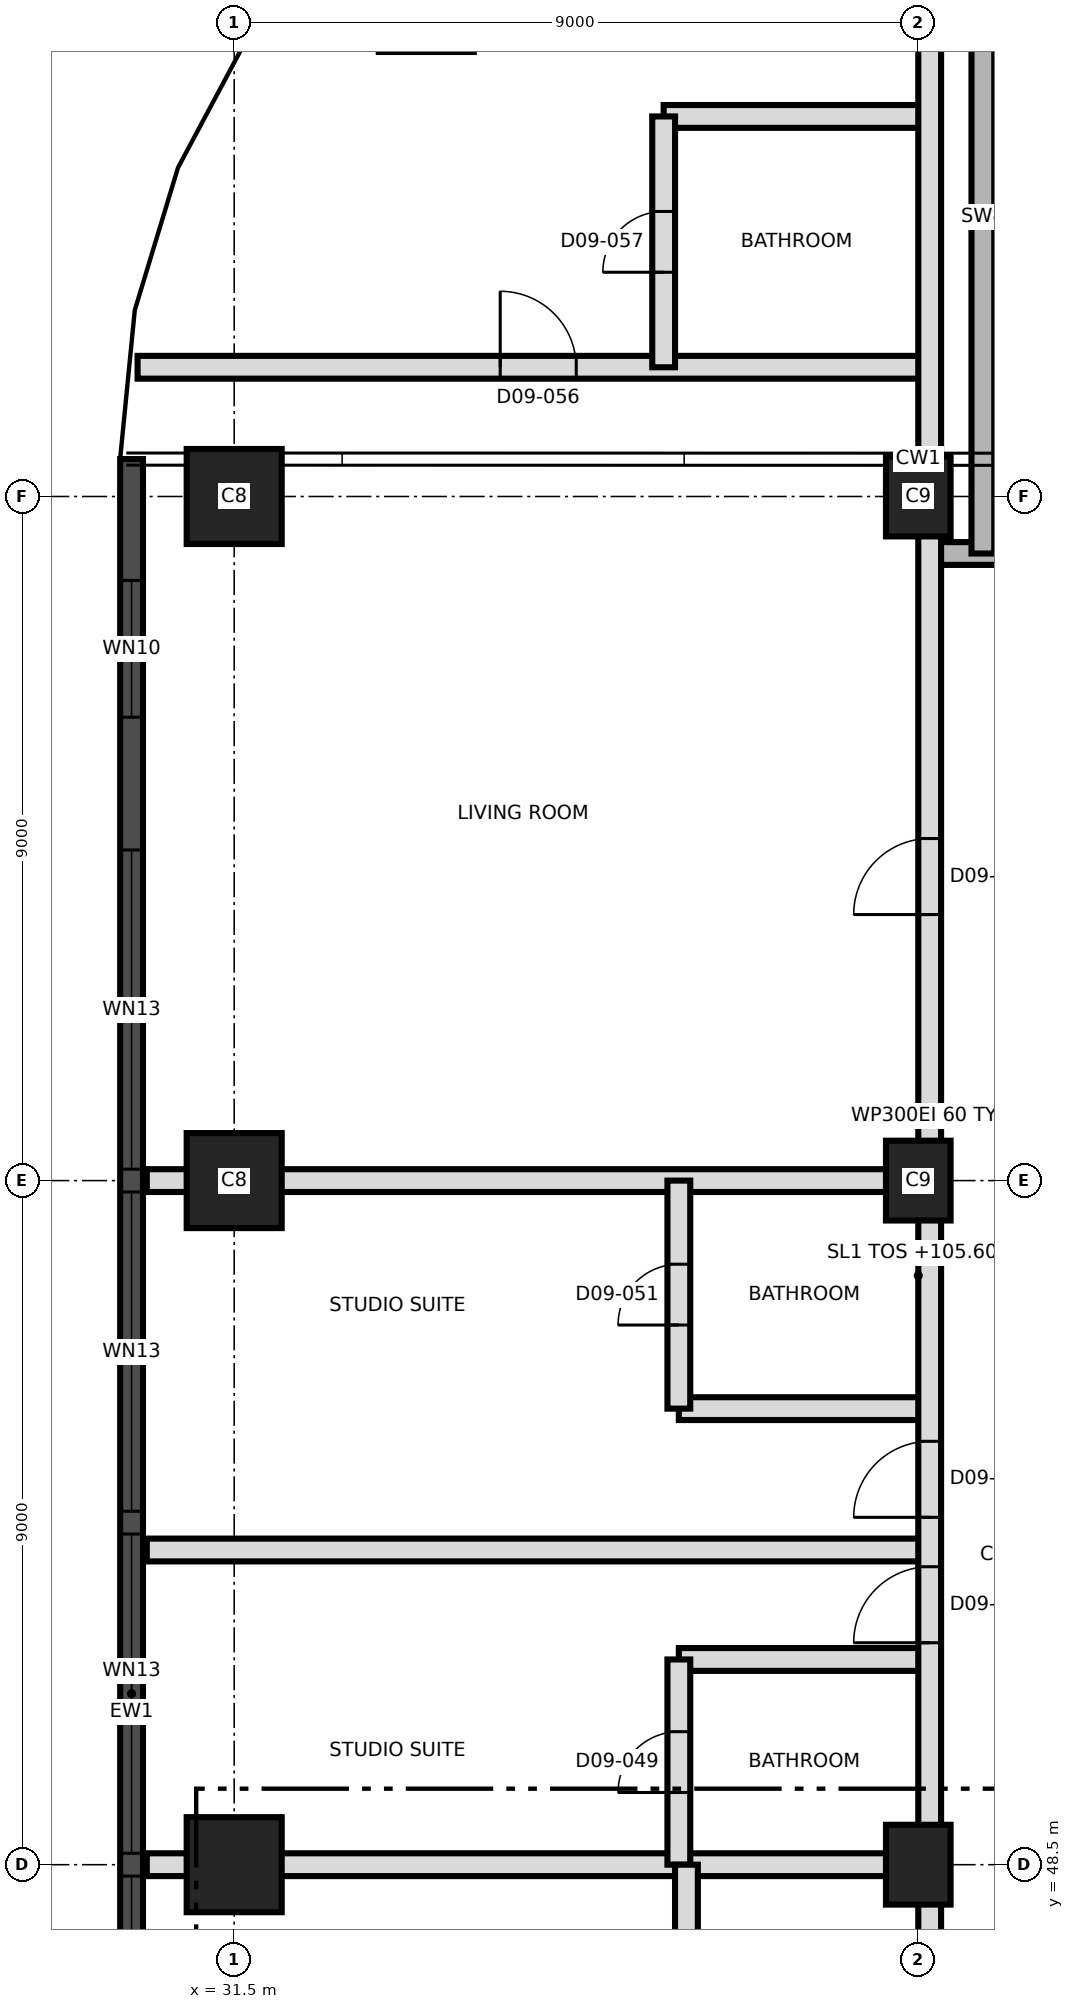
"""IFC4 building model, lengths in metres.
Left out: names, types, materials, properties, quantities, classifications, styles, units other than length and angle.
Written with IfcOpenShell. Run it as: python <this file> out.ifc"""

import sys

from ifc_helpers import new_model, si_unit, direction, frame, frame_2d, origin, origin_2d, place, context, subcontext, project, spatial, rectangle, extrude, element, fill, save


model = new_model("IFC4")
c1 = context("Model", 3, precision=1e-05, world=origin(), true_north=direction((0.0, 1.0)))
c2 = subcontext(c1, "Body", "Model", "MODEL_VIEW")
j1 = project(units=[si_unit("LENGTHUNIT", "METRE"), si_unit("PLANEANGLEUNIT", "RADIAN")], contexts=[c1])
p1 = place(None, origin())
s1 = spatial("IfcSite", under=j1, at=p1, CompositionType="ELEMENT")
p2 = place(p1, origin())
s2 = spatial("IfcBuilding", under=s1, at=p2, CompositionType="ELEMENT")
p3 = place(p2, frame((0.0, 0.0, 105.6)))
s3 = spatial("IfcBuildingStorey", under=s2, at=p3, CompositionType="ELEMENT", Elevation=105.6)
p4 = place(p3, frame((31.5, 48.5, 0.0), z_axis=(0.0, 0.0, 1.0), x_axis=(1.0, 0.0, 0.0)))
e1 = element("IfcColumn", 1, at=p4, inside=s3, PredefinedType="COLUMN", context=c2, shape_type="SweptSolid", body=[
    extrude(rectangle(XDim=1.25, YDim=1.25, at=origin_2d()), origin(), (0.0, 0.0, 1.0), 3.7),
])
p5 = place(p3, frame((40.5, 48.5, 0.0), z_axis=(0.0, 0.0, 1.0), x_axis=(0.0, 1.0, 0.0)))
e2 = element("IfcColumn", 2, at=p5, inside=s3, PredefinedType="COLUMN", context=c2, shape_type="SweptSolid", body=[
    extrude(rectangle(XDim=1.05, YDim=0.85, at=origin_2d()), origin(), (0.0, 0.0, 1.0), 3.7),
])
p6 = place(p3, frame((31.5, 57.5, 0.0), z_axis=(0.0, 0.0, 1.0), x_axis=(1.0, 0.0, 0.0)))
e3 = element("IfcColumn", 3, at=p6, inside=s3, PredefinedType="COLUMN", context=c2, shape_type="SweptSolid", body=[
    extrude(rectangle(XDim=1.25, YDim=1.25, at=origin_2d()), origin(), (0.0, 0.0, 1.0), 3.7),
])
p7 = place(p3, frame((40.5, 57.5, 0.0), z_axis=(0.0, 0.0, 1.0), x_axis=(0.0, 1.0, 0.0)))
e4 = element("IfcColumn", 4, at=p7, inside=s3, PredefinedType="COLUMN", context=c2, shape_type="SweptSolid", body=[
    extrude(rectangle(XDim=1.05, YDim=0.85, at=origin_2d()), origin(), (0.0, 0.0, 1.0), 3.7),
])
p8 = place(p3, frame((31.5, 66.5, 0.0), z_axis=(0.0, 0.0, 1.0), x_axis=(1.0, 0.0, 0.0)))
e5 = element("IfcColumn", 5, at=p8, inside=s3, PredefinedType="COLUMN", context=c2, shape_type="SweptSolid", body=[
    extrude(rectangle(XDim=1.25, YDim=1.25, at=origin_2d()), origin(), (0.0, 0.0, 1.0), 3.7),
])
p9 = place(p3, frame((40.5, 66.5, 0.0), z_axis=(0.0, 0.0, 1.0), x_axis=(0.0, 1.0, 0.0)))
e6 = element("IfcColumn", 6, at=p9, inside=s3, PredefinedType="COLUMN", context=c2, shape_type="SweptSolid", body=[
    extrude(rectangle(XDim=1.05, YDim=0.85, at=origin_2d()), origin(), (0.0, 0.0, 1.0), 3.7),
])
p10 = place(p3, frame((34.027, 72.973, 0.0), z_axis=(0.0, 0.0, 1.0), x_axis=(1.0, 0.0, 0.0)))
e7 = element("IfcColumn", 7, at=p10, inside=s3, PredefinedType="COLUMN", context=c2, shape_type="SweptSolid", body=[
    extrude(rectangle(XDim=1.25, YDim=1.25, at=origin_2d()), origin(), (0.0, 0.0, 1.0), 3.7),
])
p11 = place(p3, frame((30.15, 66.992, 0.0), z_axis=(0.0, 0.0, 1.0), x_axis=(0.0, -1.0, 0.0)))
e8 = element("IfcWall", 8, at=p11, inside=s3, PredefinedType="SOLIDWALL", context=c2, shape_type="SweptSolid", body=[
    extrude(rectangle(XDim=32.968, YDim=0.3, at=frame_2d((16.484, 0.0))), origin(), (0.0, 0.0, 1.0), 3.4),
])
p12 = place(p11, frame((1.596, 0.0, 0.3)))
e9 = element("IfcOpeningElement", 9, at=p12, cuts=e8, PredefinedType="OPENING", context=c2, shape_type="SweptSolid", body=[
    extrude(rectangle(XDim=1.8, YDim=2.4, at=frame_2d((0.9, 1.2))), frame((0.0, 0.16, 0.0), z_axis=(0.0, -1.0, 0.0), x_axis=(1.0, 0.0, 0.0)), (0.0, 0.0, 1.0), 0.32),
])
p13 = place(p11, frame((5.142, 0.0, 0.9)))
e10 = element("IfcOpeningElement", 10, at=p13, cuts=e8, PredefinedType="OPENING", context=c2, shape_type="SweptSolid", body=[
    extrude(rectangle(XDim=4.2, YDim=1.7, at=frame_2d((2.1, 0.85))), frame((0.0, 0.16, 0.0), z_axis=(0.0, -1.0, 0.0), x_axis=(1.0, 0.0, 0.0)), (0.0, 0.0, 1.0), 0.32),
])
p14 = place(p11, frame((9.642, 0.0, 0.9)))
e11 = element("IfcOpeningElement", 11, at=p14, cuts=e8, PredefinedType="OPENING", context=c2, shape_type="SweptSolid", body=[
    extrude(rectangle(XDim=4.2, YDim=1.7, at=frame_2d((2.1, 0.85))), frame((0.0, 0.16, 0.0), z_axis=(0.0, -1.0, 0.0), x_axis=(1.0, 0.0, 0.0)), (0.0, 0.0, 1.0), 0.32),
])
p15 = place(p11, frame((14.142, 0.0, 0.9)))
e12 = element("IfcOpeningElement", 12, at=p15, cuts=e8, PredefinedType="OPENING", context=c2, shape_type="SweptSolid", body=[
    extrude(rectangle(XDim=4.2, YDim=1.7, at=frame_2d((2.1, 0.85))), frame((0.0, 0.16, 0.0), z_axis=(0.0, -1.0, 0.0), x_axis=(1.0, 0.0, 0.0)), (0.0, 0.0, 1.0), 0.32),
])
p16 = place(p11, frame((18.642, 0.0, 0.9)))
e13 = element("IfcOpeningElement", 13, at=p16, cuts=e8, PredefinedType="OPENING", context=c2, shape_type="SweptSolid", body=[
    extrude(rectangle(XDim=4.2, YDim=1.7, at=frame_2d((2.1, 0.85))), frame((0.0, 0.16, 0.0), z_axis=(0.0, -1.0, 0.0), x_axis=(1.0, 0.0, 0.0)), (0.0, 0.0, 1.0), 0.32),
])
p17 = place(p11, frame((23.142, 0.0, 0.9)))
e14 = element("IfcOpeningElement", 14, at=p17, cuts=e8, PredefinedType="OPENING", context=c2, shape_type="SweptSolid", body=[
    extrude(rectangle(XDim=4.2, YDim=1.7, at=frame_2d((2.1, 0.85))), frame((0.0, 0.16, 0.0), z_axis=(0.0, -1.0, 0.0), x_axis=(1.0, 0.0, 0.0)), (0.0, 0.0, 1.0), 0.32),
])
p18 = place(p11, frame((29.33, 0.0, 0.3)))
e15 = element("IfcOpeningElement", 15, at=p18, cuts=e8, PredefinedType="OPENING", context=c2, shape_type="SweptSolid", body=[
    extrude(rectangle(XDim=1.8, YDim=2.4, at=frame_2d((0.9, 1.2))), frame((0.0, 0.16, 0.0), z_axis=(0.0, -1.0, 0.0), x_axis=(1.0, 0.0, 0.0)), (0.0, 0.0, 1.0), 0.32),
])
p19 = place(p3, frame((30.35, 48.5, 0.0), z_axis=(0.0, 0.0, 1.0), x_axis=(1.0, 0.0, 0.0)))
e16 = element("IfcWall", 16, at=p19, inside=s3, PredefinedType="PARTITIONING", context=c2, shape_type="SweptSolid", body=[
    extrude(rectangle(XDim=10.3, YDim=0.3, at=frame_2d((5.15, 0.0))), origin(), (0.0, 0.0, 1.0), 3.4),
])
p20 = place(p3, frame((37.35, 51.2, 0.0), z_axis=(0.0, 0.0, 1.0), x_axis=(1.0, 0.0, 0.0)))
e17 = element("IfcWall", 17, at=p20, inside=s3, PredefinedType="PARTITIONING", context=c2, shape_type="SweptSolid", body=[
    extrude(rectangle(XDim=3.3, YDim=0.3, at=frame_2d((1.65, 0.0))), origin(), (0.0, 0.0, 1.0), 3.4),
])
p21 = place(p3, frame((30.35, 52.64, 0.0), z_axis=(0.0, 0.0, 1.0), x_axis=(1.0, 0.0, 0.0)))
e18 = element("IfcWall", 18, at=p21, inside=s3, PredefinedType="PARTITIONING", context=c2, shape_type="SweptSolid", body=[
    extrude(rectangle(XDim=10.3, YDim=0.3, at=frame_2d((5.15, 0.0))), origin(), (0.0, 0.0, 1.0), 3.4),
])
p22 = place(p3, frame((37.35, 54.5, 0.0), z_axis=(0.0, 0.0, 1.0), x_axis=(1.0, 0.0, 0.0)))
e19 = element("IfcWall", 19, at=p22, inside=s3, PredefinedType="PARTITIONING", context=c2, shape_type="SweptSolid", body=[
    extrude(rectangle(XDim=3.3, YDim=0.3, at=frame_2d((1.65, 0.0))), origin(), (0.0, 0.0, 1.0), 3.4),
])
p23 = place(p3, frame((30.35, 57.5, 0.0), z_axis=(0.0, 0.0, 1.0), x_axis=(1.0, 0.0, 0.0)))
e20 = element("IfcWall", 20, at=p23, inside=s3, PredefinedType="PARTITIONING", context=c2, shape_type="SweptSolid", body=[
    extrude(rectangle(XDim=10.3, YDim=0.3, at=frame_2d((5.15, 0.0))), origin(), (0.0, 0.0, 1.0), 3.4),
])
p24 = place(p3, frame((40.65, 65.75, 0.0), z_axis=(0.0, 0.0, 1.0), x_axis=(1.0, 0.0, 0.0)))
e21 = element("IfcWall", 21, at=p24, inside=s3, PredefinedType="SHEAR", context=c2, shape_type="SweptSolid", body=[
    extrude(rectangle(XDim=3.7, YDim=0.3, at=frame_2d((1.85, 0.0))), origin(), (0.0, 0.0, 1.0), 3.4),
])
p25 = place(p24, frame((1.1, 0.0, 0.0)))
e22 = element("IfcOpeningElement", 22, at=p25, cuts=e21, PredefinedType="OPENING", context=c2, shape_type="SweptSolid", body=[
    extrude(rectangle(XDim=1.2, YDim=2.1, at=frame_2d((0.6, 1.05))), frame((0.0, 0.16, 0.0), z_axis=(0.0, -1.0, 0.0), x_axis=(1.0, 0.0, 0.0)), (0.0, 0.0, 1.0), 0.32),
])
p26 = place(p3, frame((30.229, 68.2, 0.0), z_axis=(0.0, 0.0, 1.0), x_axis=(1.0, 0.0, 0.0)))
e23 = element("IfcWall", 23, at=p26, inside=s3, PredefinedType="PARTITIONING", context=c2, shape_type="SweptSolid", body=[
    extrude(rectangle(XDim=10.421, YDim=0.3, at=frame_2d((5.21, 0.0))), origin(), (0.0, 0.0, 1.0), 3.4),
])
p27 = place(p26, frame((4.771, 0.0, 0.0)))
e24 = element("IfcOpeningElement", 24, at=p27, cuts=e23, PredefinedType="OPENING", context=c2, shape_type="SweptSolid", body=[
    extrude(rectangle(XDim=1.0, YDim=2.1, at=frame_2d((0.5, 1.05))), frame((0.0, 0.16, 0.0), z_axis=(0.0, -1.0, 0.0), x_axis=(1.0, 0.0, 0.0)), (0.0, 0.0, 1.0), 0.32),
])
p28 = place(p3, frame((37.15, 71.5, 0.0), z_axis=(0.0, 0.0, 1.0), x_axis=(1.0, 0.0, 0.0)))
e25 = element("IfcWall", 25, at=p28, inside=s3, PredefinedType="PARTITIONING", context=c2, shape_type="SweptSolid", body=[
    extrude(rectangle(XDim=3.5, YDim=0.3, at=frame_2d((1.75, 0.0))), origin(), (0.0, 0.0, 1.0), 3.4),
])
p29 = place(p3, frame((37.15, 68.2, 0.0), z_axis=(0.0, 0.0, 1.0), x_axis=(0.0, 1.0, 0.0)))
e26 = element("IfcWall", 26, at=p29, inside=s3, PredefinedType="PARTITIONING", context=c2, shape_type="SweptSolid", body=[
    extrude(rectangle(XDim=3.3, YDim=0.3, at=frame_2d((1.65, 0.0))), origin(), (0.0, 0.0, 1.0), 3.4),
])
p30 = place(p29, frame((1.25, 0.0, 0.0)))
e27 = element("IfcOpeningElement", 27, at=p30, cuts=e26, PredefinedType="OPENING", context=c2, shape_type="SweptSolid", body=[
    extrude(rectangle(XDim=0.8, YDim=2.1, at=frame_2d((0.4, 1.05))), frame((0.0, 0.16, 0.0), z_axis=(0.0, -1.0, 0.0), x_axis=(1.0, 0.0, 0.0)), (0.0, 0.0, 1.0), 0.32),
])
p31 = place(p3, frame((37.35, 48.5, 0.0), z_axis=(0.0, 0.0, 1.0), x_axis=(0.0, 1.0, 0.0)))
e28 = element("IfcWall", 28, at=p31, inside=s3, PredefinedType="PARTITIONING", context=c2, shape_type="SweptSolid", body=[
    extrude(rectangle(XDim=2.7, YDim=0.3, at=frame_2d((1.35, 0.0))), origin(), (0.0, 0.0, 1.0), 3.4),
])
p32 = place(p31, frame((0.95, 0.0, 0.0)))
e29 = element("IfcOpeningElement", 29, at=p32, cuts=e28, PredefinedType="OPENING", context=c2, shape_type="SweptSolid", body=[
    extrude(rectangle(XDim=0.8, YDim=2.1, at=frame_2d((0.4, 1.05))), frame((0.0, 0.16, 0.0), z_axis=(0.0, -1.0, 0.0), x_axis=(1.0, 0.0, 0.0)), (0.0, 0.0, 1.0), 0.32),
])
p33 = place(p3, frame((37.35, 54.5, 0.0), z_axis=(0.0, 0.0, 1.0), x_axis=(0.0, 1.0, 0.0)))
e30 = element("IfcWall", 30, at=p33, inside=s3, PredefinedType="PARTITIONING", context=c2, shape_type="SweptSolid", body=[
    extrude(rectangle(XDim=3.0, YDim=0.3, at=frame_2d((1.5, 0.0))), origin(), (0.0, 0.0, 1.0), 3.4),
])
p34 = place(p33, frame((1.1, 0.0, 0.0)))
e31 = element("IfcOpeningElement", 31, at=p34, cuts=e30, PredefinedType="OPENING", context=c2, shape_type="SweptSolid", body=[
    extrude(rectangle(XDim=0.8, YDim=2.1, at=frame_2d((0.4, 1.05))), frame((0.0, 0.16, 0.0), z_axis=(0.0, -1.0, 0.0), x_axis=(1.0, 0.0, 0.0)), (0.0, 0.0, 1.0), 0.32),
])
p35 = place(p3, frame((37.45, 45.8, 0.0), z_axis=(0.0, 0.0, 1.0), x_axis=(0.0, 1.0, 0.0)))
e32 = element("IfcWall", 32, at=p35, inside=s3, PredefinedType="PARTITIONING", context=c2, shape_type="SweptSolid", body=[
    extrude(rectangle(XDim=2.7, YDim=0.3, at=frame_2d((1.35, 0.0))), origin(), (0.0, 0.0, 1.0), 3.4),
])
p36 = place(p35, frame((0.95, 0.0, 0.0)))
e33 = element("IfcOpeningElement", 33, at=p36, cuts=e32, PredefinedType="OPENING", context=c2, shape_type="SweptSolid", body=[
    extrude(rectangle(XDim=0.8, YDim=2.1, at=frame_2d((0.4, 1.05))), frame((0.0, 0.16, 0.0), z_axis=(0.0, -1.0, 0.0), x_axis=(1.0, 0.0, 0.0)), (0.0, 0.0, 1.0), 0.32),
])
p37 = place(p3, frame((40.65, 39.8, 0.0), z_axis=(0.0, 0.0, 1.0), x_axis=(0.0, 1.0, 0.0)))
e34 = element("IfcWall", 34, at=p37, inside=s3, PredefinedType="PARTITIONING", context=c2, shape_type="SweptSolid", body=[
    extrude(rectangle(XDim=37.09, YDim=0.3, at=frame_2d((18.545, 0.0))), origin(), (0.0, 0.0, 1.0), 3.4),
])
p38 = place(p37, frame((0.835, 0.0, 0.0)))
e35 = element("IfcOpeningElement", 35, at=p38, cuts=e34, PredefinedType="OPENING", context=c2, shape_type="SweptSolid", body=[
    extrude(rectangle(XDim=1.2, YDim=2.1, at=frame_2d((0.6, 1.05))), frame((0.0, 0.16, 0.0), z_axis=(0.0, -1.0, 0.0), x_axis=(1.0, 0.0, 0.0)), (0.0, 0.0, 1.0), 0.32),
])
p39 = place(p37, frame((4.085, 0.0, 0.0)))
e36 = element("IfcOpeningElement", 36, at=p39, cuts=e34, PredefinedType="OPENING", context=c2, shape_type="SweptSolid", body=[
    extrude(rectangle(XDim=1.0, YDim=2.1, at=frame_2d((0.5, 1.05))), frame((0.0, 0.16, 0.0), z_axis=(0.0, -1.0, 0.0), x_axis=(1.0, 0.0, 0.0)), (0.0, 0.0, 1.0), 0.32),
])
p40 = place(p37, frame((11.62, 0.0, 0.0)))
e37 = element("IfcOpeningElement", 37, at=p40, cuts=e34, PredefinedType="OPENING", context=c2, shape_type="SweptSolid", body=[
    extrude(rectangle(XDim=1.0, YDim=2.4, at=frame_2d((0.5, 1.2))), frame((0.0, 0.16, 0.0), z_axis=(0.0, -1.0, 0.0), x_axis=(1.0, 0.0, 0.0)), (0.0, 0.0, 1.0), 0.32),
])
p41 = place(p37, frame((13.27, 0.0, 0.0)))
e38 = element("IfcOpeningElement", 38, at=p41, cuts=e34, PredefinedType="OPENING", context=c2, shape_type="SweptSolid", body=[
    extrude(rectangle(XDim=1.0, YDim=2.4, at=frame_2d((0.5, 1.2))), frame((0.0, 0.16, 0.0), z_axis=(0.0, -1.0, 0.0), x_axis=(1.0, 0.0, 0.0)), (0.0, 0.0, 1.0), 0.32),
])
p42 = place(p37, frame((21.2, 0.0, 0.0)))
e39 = element("IfcOpeningElement", 39, at=p42, cuts=e34, PredefinedType="OPENING", context=c2, shape_type="SweptSolid", body=[
    extrude(rectangle(XDim=1.0, YDim=2.4, at=frame_2d((0.5, 1.2))), frame((0.0, 0.16, 0.0), z_axis=(0.0, -1.0, 0.0), x_axis=(1.0, 0.0, 0.0)), (0.0, 0.0, 1.0), 0.32),
])
p43 = place(p3, frame((41.35, 65.75, 0.0), z_axis=(0.0, 0.0, 1.0), x_axis=(0.0, 1.0, 0.0)))
e40 = element("IfcWall", 40, at=p43, inside=s3, PredefinedType="SHEAR", context=c2, shape_type="SweptSolid", body=[
    extrude(rectangle(XDim=8.85, YDim=0.3, at=frame_2d((4.425, 0.0))), origin(), (0.0, 0.0, 1.0), 3.4),
])
p44 = place(p12, origin())
e41 = element("IfcWindow", 41, at=p44, inside=s3, PartitioningType="SINGLE_PANEL", PredefinedType="WINDOW", context=c2, shape_type="SweptSolid", body=[
    extrude(rectangle(XDim=1.8, YDim=2.4, at=frame_2d((0.9, 1.2))), frame((0.0, 0.03, 0.0), z_axis=(0.0, -1.0, 0.0), x_axis=(1.0, 0.0, 0.0)), (0.0, 0.0, 1.0), 0.06),
])
fill(e9, e41)
p45 = place(p13, origin())
e42 = element("IfcWindow", 42, at=p45, inside=s3, PartitioningType="SINGLE_PANEL", PredefinedType="WINDOW", context=c2, shape_type="SweptSolid", body=[
    extrude(rectangle(XDim=4.2, YDim=1.7, at=frame_2d((2.1, 0.85))), frame((0.0, 0.03, 0.0), z_axis=(0.0, -1.0, 0.0), x_axis=(1.0, 0.0, 0.0)), (0.0, 0.0, 1.0), 0.06),
])
fill(e10, e42)
p46 = place(p14, origin())
e43 = element("IfcWindow", 43, at=p46, inside=s3, PartitioningType="SINGLE_PANEL", PredefinedType="WINDOW", context=c2, shape_type="SweptSolid", body=[
    extrude(rectangle(XDim=4.2, YDim=1.7, at=frame_2d((2.1, 0.85))), frame((0.0, 0.03, 0.0), z_axis=(0.0, -1.0, 0.0), x_axis=(1.0, 0.0, 0.0)), (0.0, 0.0, 1.0), 0.06),
])
fill(e11, e43)
p47 = place(p15, origin())
e44 = element("IfcWindow", 44, at=p47, inside=s3, PartitioningType="SINGLE_PANEL", PredefinedType="WINDOW", context=c2, shape_type="SweptSolid", body=[
    extrude(rectangle(XDim=4.2, YDim=1.7, at=frame_2d((2.1, 0.85))), frame((0.0, 0.03, 0.0), z_axis=(0.0, -1.0, 0.0), x_axis=(1.0, 0.0, 0.0)), (0.0, 0.0, 1.0), 0.06),
])
fill(e12, e44)
p48 = place(p16, origin())
e45 = element("IfcWindow", 45, at=p48, inside=s3, PartitioningType="SINGLE_PANEL", PredefinedType="WINDOW", context=c2, shape_type="SweptSolid", body=[
    extrude(rectangle(XDim=4.2, YDim=1.7, at=frame_2d((2.1, 0.85))), frame((0.0, 0.03, 0.0), z_axis=(0.0, -1.0, 0.0), x_axis=(1.0, 0.0, 0.0)), (0.0, 0.0, 1.0), 0.06),
])
fill(e13, e45)
p49 = place(p32, origin())
e46 = element("IfcDoor", 46, at=p49, inside=s3, OperationType="SINGLE_SWING_RIGHT", PredefinedType="DOOR", context=c2, shape_type="SweptSolid", body=[
    extrude(rectangle(XDim=0.8, YDim=2.1, at=frame_2d((0.4, 1.05))), frame((0.0, 0.025, 0.0), z_axis=(0.0, -1.0, 0.0), x_axis=(1.0, 0.0, 0.0)), (0.0, 0.0, 1.0), 0.05),
])
fill(e29, e46)
p50 = place(p40, origin())
e47 = element("IfcDoor", 47, at=p50, inside=s3, OperationType="SINGLE_SWING_LEFT", PredefinedType="DOOR", context=c2, shape_type="SweptSolid", body=[
    extrude(rectangle(XDim=1.0, YDim=2.4, at=frame_2d((0.5, 1.2))), frame((0.0, 0.025, 0.0), z_axis=(0.0, -1.0, 0.0), x_axis=(1.0, 0.0, 0.0)), (0.0, 0.0, 1.0), 0.05),
])
fill(e37, e47)
p51 = place(p34, origin())
e48 = element("IfcDoor", 48, at=p51, inside=s3, OperationType="SINGLE_SWING_LEFT", PredefinedType="DOOR", context=c2, shape_type="SweptSolid", body=[
    extrude(rectangle(XDim=0.8, YDim=2.1, at=frame_2d((0.4, 1.05))), frame((0.0, 0.025, 0.0), z_axis=(0.0, -1.0, 0.0), x_axis=(1.0, 0.0, 0.0)), (0.0, 0.0, 1.0), 0.05),
])
fill(e31, e48)
p52 = place(p41, origin())
e49 = element("IfcDoor", 49, at=p52, inside=s3, OperationType="SINGLE_SWING_LEFT", PredefinedType="DOOR", context=c2, shape_type="SweptSolid", body=[
    extrude(rectangle(XDim=1.0, YDim=2.4, at=frame_2d((0.5, 1.2))), frame((0.0, 0.025, 0.0), z_axis=(0.0, -1.0, 0.0), x_axis=(1.0, 0.0, 0.0)), (0.0, 0.0, 1.0), 0.05),
])
fill(e38, e49)
p53 = place(p42, origin())
e50 = element("IfcDoor", 50, at=p53, inside=s3, OperationType="SINGLE_SWING_LEFT", PredefinedType="DOOR", context=c2, shape_type="SweptSolid", body=[
    extrude(rectangle(XDim=1.0, YDim=2.4, at=frame_2d((0.5, 1.2))), frame((0.0, 0.025, 0.0), z_axis=(0.0, -1.0, 0.0), x_axis=(1.0, 0.0, 0.0)), (0.0, 0.0, 1.0), 0.05),
])
fill(e39, e50)
p54 = place(p27, origin())
e51 = element("IfcDoor", 51, at=p54, inside=s3, OperationType="SINGLE_SWING_RIGHT", PredefinedType="DOOR", context=c2, shape_type="SweptSolid", body=[
    extrude(rectangle(XDim=1.0, YDim=2.1, at=frame_2d((0.5, 1.05))), frame((0.0, 0.025, 0.0), z_axis=(0.0, -1.0, 0.0), x_axis=(1.0, 0.0, 0.0)), (0.0, 0.0, 1.0), 0.05),
])
fill(e24, e51)
p55 = place(p30, origin())
e52 = element("IfcDoor", 52, at=p55, inside=s3, OperationType="SINGLE_SWING_LEFT", PredefinedType="DOOR", context=c2, shape_type="SweptSolid", body=[
    extrude(rectangle(XDim=0.8, YDim=2.1, at=frame_2d((0.4, 1.05))), frame((0.0, 0.025, 0.0), z_axis=(0.0, -1.0, 0.0), x_axis=(1.0, 0.0, 0.0)), (0.0, 0.0, 1.0), 0.05),
])
fill(e27, e52)
save(model, sys.argv[1])
